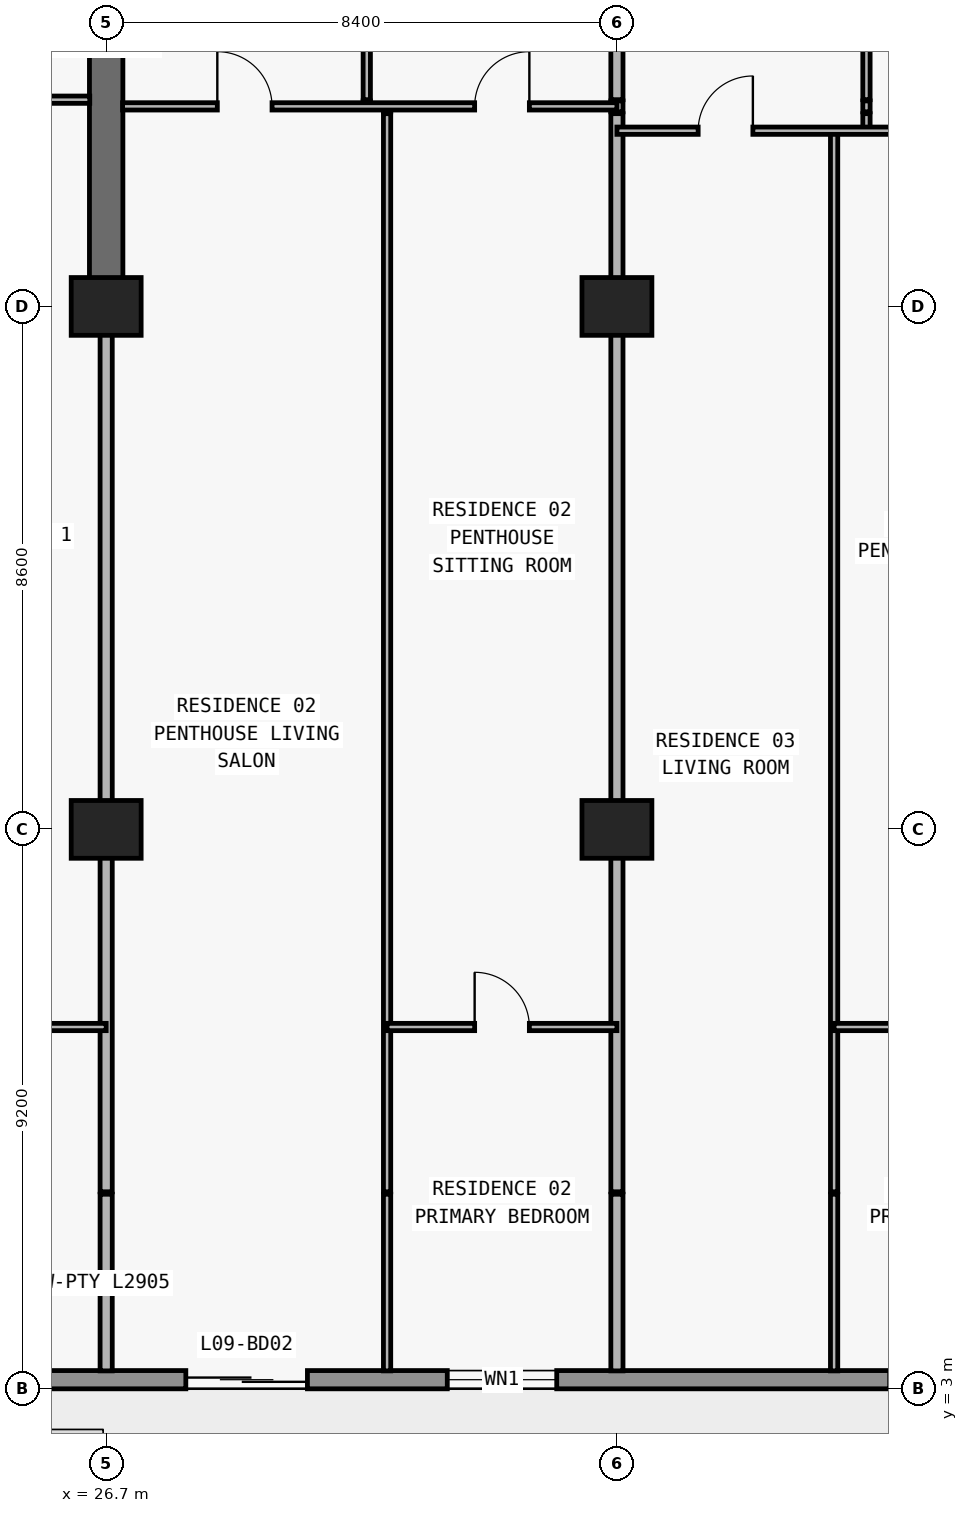
"""IFC4 building model, lengths in metres.
Left out: names, types, materials, properties, quantities, classifications, styles, units other than length and angle.
Written with IfcOpenShell. Run it as: python <this file> out.ifc"""

import sys

from ifc_helpers import new_model, si_unit, direction, frame, frame_2d, origin, origin_2d, place, context, subcontext, project, spatial, rectangle, extrude, element, fill, save


model = new_model("IFC4")
c1 = context("Model", 3, precision=1e-05, world=origin(), true_north=direction((0.0, 1.0)))
c2 = subcontext(c1, "Body", "Model", "MODEL_VIEW")
j1 = project(units=[si_unit("LENGTHUNIT", "METRE"), si_unit("PLANEANGLEUNIT", "RADIAN")], contexts=[c1])
p1 = place(None, origin())
s1 = spatial("IfcSite", under=j1, at=p1, CompositionType="ELEMENT")
p2 = place(p1, origin())
s2 = spatial("IfcBuilding", under=s1, at=p2, CompositionType="ELEMENT")
p3 = place(p2, frame((0.0, 0.0, 39.9)))
s3 = spatial("IfcBuildingStorey", under=s2, at=p3, CompositionType="ELEMENT", Elevation=39.9)
for number, where, z_axis, x_axis in (
    (1, (26.7, 12.2, 0.0), (0.0, 0.0, 1.0), (1.0, 0.0, 0.0)),
    (2, (35.1, 12.2, 0.0), (0.0, 0.0, 1.0), (1.0, 0.0, 0.0)),
    (3, (26.7, 20.8, 0.0), (0.0, 0.0, 1.0), (1.0, 0.0, 0.0)),
    (4, (35.1, 20.8, 0.0), (0.0, 0.0, 1.0), (1.0, 0.0, 0.0)),
):
    element("IfcColumn", number, at=place(p3, frame(where, z_axis=z_axis, x_axis=x_axis)), inside=s3, PredefinedType="COLUMN", context=c2, shape_type="SweptSolid", body=[
        extrude(rectangle(XDim=1.15, YDim=0.95, at=origin_2d()), origin(), (0.0, 0.0, 1.0), 3.05),
    ])
p4 = place(p3, frame((26.7, 20.8, 0.0), z_axis=(0.0, 0.0, 1.0), x_axis=(0.0, 1.0, 0.0)))
e5 = element("IfcWall", 5, at=p4, inside=s3, PredefinedType="SHEAR", context=c2, shape_type="SweptSolid", body=[
    extrude(rectangle(XDim=8.6, YDim=0.55, at=frame_2d((4.3, 0.0))), origin(), (0.0, 0.0, 1.0), 3.05),
])
p5 = place(p3, frame((72.7, 3.15, 0.0), z_axis=(0.0, 0.0, 1.0), x_axis=(-1.0, 0.0, 0.0)))
e6 = element("IfcWall", 6, at=p5, inside=s3, PredefinedType="STANDARD", context=c2, shape_type="SweptSolid", body=[
    extrude(rectangle(XDim=67.6, YDim=0.3, at=frame_2d((33.8, 0.0))), origin(), (0.0, 0.0, 1.0), 3.05),
])
p6 = place(p5, frame((59.89, 0.0, 0.0)))
e7 = element("IfcOpeningElement", 7, at=p6, cuts=e6, PredefinedType="OPENING", context=c2, shape_type="SweptSolid", body=[
    extrude(rectangle(XDim=2.0, YDim=2.3, at=frame_2d((1.0, 1.15))), frame((0.0, 0.16, 0.0), z_axis=(0.0, -1.0, 0.0), x_axis=(1.0, 0.0, 0.0)), (0.0, 0.0, 1.0), 0.32),
])
p7 = place(p5, frame((55.21, 0.0, 0.65)))
e8 = element("IfcOpeningElement", 8, at=p7, cuts=e6, PredefinedType="OPENING", context=c2, shape_type="SweptSolid", body=[
    extrude(rectangle(XDim=2.6, YDim=1.85, at=frame_2d((1.3, 0.925))), frame((0.0, 0.16, 0.0), z_axis=(0.0, -1.0, 0.0), x_axis=(1.0, 0.0, 0.0)), (0.0, 0.0, 1.0), 0.32),
])
p8 = place(p5, frame((49.1, 0.0, 0.85)))
e9 = element("IfcOpeningElement", 9, at=p8, cuts=e6, PredefinedType="OPENING", context=c2, shape_type="SweptSolid", body=[
    extrude(rectangle(XDim=2.2, YDim=1.55, at=frame_2d((1.1, 0.775))), frame((0.0, 0.16, 0.0), z_axis=(0.0, -1.0, 0.0), x_axis=(1.0, 0.0, 0.0)), (0.0, 0.0, 1.0), 0.32),
])
p9 = place(p5, frame((42.69, 0.0, 0.0)))
e10 = element("IfcOpeningElement", 10, at=p9, cuts=e6, PredefinedType="OPENING", context=c2, shape_type="SweptSolid", body=[
    extrude(rectangle(XDim=2.0, YDim=2.3, at=frame_2d((1.0, 1.15))), frame((0.0, 0.16, 0.0), z_axis=(0.0, -1.0, 0.0), x_axis=(1.0, 0.0, 0.0)), (0.0, 0.0, 1.0), 0.32),
])
p10 = place(p5, frame((38.59, 0.0, 0.85)))
e11 = element("IfcOpeningElement", 11, at=p10, cuts=e6, PredefinedType="OPENING", context=c2, shape_type="SweptSolid", body=[
    extrude(rectangle(XDim=1.8, YDim=1.55, at=frame_2d((0.9, 0.775))), frame((0.0, 0.16, 0.0), z_axis=(0.0, -1.0, 0.0), x_axis=(1.0, 0.0, 0.0)), (0.0, 0.0, 1.0), 0.32),
])
p11 = place(p5, frame((30.914, 0.0, 0.85)))
e12 = element("IfcOpeningElement", 12, at=p11, cuts=e6, PredefinedType="OPENING", context=c2, shape_type="SweptSolid", body=[
    extrude(rectangle(XDim=2.2, YDim=1.55, at=frame_2d((1.1, 0.775))), frame((0.0, 0.16, 0.0), z_axis=(0.0, -1.0, 0.0), x_axis=(1.0, 0.0, 0.0)), (0.0, 0.0, 1.0), 0.32),
])
p12 = place(p5, frame((26.69, 0.0, 0.0)))
e13 = element("IfcOpeningElement", 13, at=p12, cuts=e6, PredefinedType="OPENING", context=c2, shape_type="SweptSolid", body=[
    extrude(rectangle(XDim=2.0, YDim=2.3, at=frame_2d((1.0, 1.15))), frame((0.0, 0.16, 0.0), z_axis=(0.0, -1.0, 0.0), x_axis=(1.0, 0.0, 0.0)), (0.0, 0.0, 1.0), 0.32),
])
p13 = place(p5, frame((22.59, 0.0, 0.85)))
e14 = element("IfcOpeningElement", 14, at=p13, cuts=e6, PredefinedType="OPENING", context=c2, shape_type="SweptSolid", body=[
    extrude(rectangle(XDim=1.8, YDim=1.55, at=frame_2d((0.9, 0.775))), frame((0.0, 0.16, 0.0), z_axis=(0.0, -1.0, 0.0), x_axis=(1.0, 0.0, 0.0)), (0.0, 0.0, 1.0), 0.32),
])
p14 = place(p5, frame((18.69, 0.0, 0.0)))
e15 = element("IfcOpeningElement", 15, at=p14, cuts=e6, PredefinedType="OPENING", context=c2, shape_type="SweptSolid", body=[
    extrude(rectangle(XDim=2.0, YDim=2.3, at=frame_2d((1.0, 1.15))), frame((0.0, 0.16, 0.0), z_axis=(0.0, -1.0, 0.0), x_axis=(1.0, 0.0, 0.0)), (0.0, 0.0, 1.0), 0.32),
])
p15 = place(p5, frame((14.01, 0.0, 0.65)))
e16 = element("IfcOpeningElement", 16, at=p15, cuts=e6, PredefinedType="OPENING", context=c2, shape_type="SweptSolid", body=[
    extrude(rectangle(XDim=2.6, YDim=1.85, at=frame_2d((1.3, 0.925))), frame((0.0, 0.16, 0.0), z_axis=(0.0, -1.0, 0.0), x_axis=(1.0, 0.0, 0.0)), (0.0, 0.0, 1.0), 0.32),
])
p16 = place(p5, frame((7.9, 0.0, 0.85)))
e17 = element("IfcOpeningElement", 17, at=p16, cuts=e6, PredefinedType="OPENING", context=c2, shape_type="SweptSolid", body=[
    extrude(rectangle(XDim=2.2, YDim=1.55, at=frame_2d((1.1, 0.775))), frame((0.0, 0.16, 0.0), z_axis=(0.0, -1.0, 0.0), x_axis=(1.0, 0.0, 0.0)), (0.0, 0.0, 1.0), 0.32),
])
p17 = place(p3, frame((26.7, 3.295, 0.0), z_axis=(0.0, 0.0, 1.0), x_axis=(0.0, 1.0, 0.0)))
e18 = element("IfcWall", 18, at=p17, inside=s3, PredefinedType="PARTITIONING", context=c2, shape_type="SweptSolid", body=[
    extrude(rectangle(XDim=2.905, YDim=0.2, at=frame_2d((1.453, 0.0))), origin(), (0.0, 0.0, 1.0), 3.05),
])
p18 = place(p3, frame((26.7, 6.24, 0.0), z_axis=(0.0, 0.0, 1.0), x_axis=(0.0, 1.0, 0.0)))
e19 = element("IfcWall", 19, at=p18, inside=s3, PredefinedType="PARTITIONING", context=c2, shape_type="SweptSolid", body=[
    extrude(rectangle(XDim=14.555, YDim=0.2, at=frame_2d((7.277, 0.0))), origin(), (0.0, 0.0, 1.0), 2.11),
])
p19 = place(p3, frame((30.986, 24.09, 0.0), z_axis=(0.0, 0.0, 1.0), x_axis=(0.0, 1.0, 0.0)))
e20 = element("IfcWall", 20, at=p19, inside=s3, PredefinedType="PARTITIONING", context=c2, shape_type="SweptSolid", body=[
    extrude(rectangle(XDim=0.09, YDim=0.12, at=frame_2d((0.045, 0.0))), origin(), (0.0, 0.0, 1.0), 2.423),
])
p20 = place(p3, frame((30.986, 24.2, 0.0), z_axis=(0.0, 0.0, 1.0), x_axis=(0.0, 1.0, 0.0)))
e21 = element("IfcWall", 21, at=p20, inside=s3, PredefinedType="PARTITIONING", context=c2, shape_type="SweptSolid", body=[
    extrude(rectangle(XDim=4.38, YDim=0.12, at=frame_2d((2.19, 0.0))), origin(), (0.0, 0.0, 1.0), 2.423),
])
p21 = place(p20, frame((1.74, 0.0, 0.0)))
e22 = element("IfcOpeningElement", 22, at=p21, cuts=e21, PredefinedType="OPENING", context=c2, shape_type="SweptSolid", body=[
    extrude(rectangle(XDim=0.9, YDim=2.15, at=frame_2d((0.45, 1.075))), frame((0.0, 0.07, 0.0), z_axis=(0.0, -1.0, 0.0), x_axis=(1.0, 0.0, 0.0)), (0.0, 0.0, 1.0), 0.14),
])
p22 = place(p3, frame((31.32, 3.295, 0.0), z_axis=(0.0, 0.0, 1.0), x_axis=(0.0, 1.0, 0.0)))
e23 = element("IfcWall", 23, at=p22, inside=s3, PredefinedType="PARTITIONING", context=c2, shape_type="SweptSolid", body=[
    extrude(rectangle(XDim=2.905, YDim=0.12, at=frame_2d((1.453, 0.0))), origin(), (0.0, 0.0, 1.0), 3.05),
])
p23 = place(p3, frame((31.32, 6.24, 0.0), z_axis=(0.0, 0.0, 1.0), x_axis=(0.0, 1.0, 0.0)))
e24 = element("IfcWall", 24, at=p23, inside=s3, PredefinedType="PARTITIONING", context=c2, shape_type="SweptSolid", body=[
    extrude(rectangle(XDim=17.73, YDim=0.12, at=frame_2d((8.865, 0.0))), origin(), (0.0, 0.0, 1.0), 3.05),
])
p24 = place(p3, frame((31.32, 24.0, 0.0), z_axis=(0.0, 0.0, 1.0), x_axis=(0.0, 1.0, 0.0)))
e25 = element("IfcWall", 25, at=p24, inside=s3, PredefinedType="PARTITIONING", context=c2, shape_type="SweptSolid", body=[
    extrude(rectangle(XDim=0.09, YDim=0.12, at=frame_2d((0.045, 0.0))), origin(), (0.0, 0.0, 1.0), 3.05),
])
p25 = place(p3, frame((35.1, 3.295, 0.0), z_axis=(0.0, 0.0, 1.0), x_axis=(0.0, 1.0, 0.0)))
e26 = element("IfcWall", 26, at=p25, inside=s3, PredefinedType="PARTITIONING", context=c2, shape_type="SweptSolid", body=[
    extrude(rectangle(XDim=2.905, YDim=0.2, at=frame_2d((1.453, 0.0))), origin(), (0.0, 0.0, 1.0), 3.05),
])
p26 = place(p3, frame((35.1, 6.24, 0.0), z_axis=(0.0, 0.0, 1.0), x_axis=(0.0, 1.0, 0.0)))
e27 = element("IfcWall", 27, at=p26, inside=s3, PredefinedType="PARTITIONING", context=c2, shape_type="SweptSolid", body=[
    extrude(rectangle(XDim=17.73, YDim=0.2, at=frame_2d((8.865, 0.0))), origin(), (0.0, 0.0, 1.0), 2.11),
])
p27 = place(p3, frame((35.1, 24.0, 0.0), z_axis=(0.0, 0.0, 1.0), x_axis=(0.0, 1.0, 0.0)))
e28 = element("IfcWall", 28, at=p27, inside=s3, PredefinedType="PARTITIONING", context=c2, shape_type="SweptSolid", body=[
    extrude(rectangle(XDim=0.18, YDim=0.2, at=frame_2d((0.09, 0.0))), origin(), (0.0, 0.0, 1.0), 2.11),
])
p28 = place(p3, frame((35.1, 24.2, 0.0), z_axis=(0.0, 0.0, 1.0), x_axis=(0.0, 1.0, 0.0)))
e29 = element("IfcWall", 29, at=p28, inside=s3, PredefinedType="PARTITIONING", context=c2, shape_type="SweptSolid", body=[
    extrude(rectangle(XDim=4.38, YDim=0.2, at=frame_2d((2.19, 0.0))), origin(), (0.0, 0.0, 1.0), 2.11),
])
p29 = place(p3, frame((38.672, 3.295, 0.0), z_axis=(0.0, 0.0, 1.0), x_axis=(0.0, 1.0, 0.0)))
e30 = element("IfcWall", 30, at=p29, inside=s3, PredefinedType="PARTITIONING", context=c2, shape_type="SweptSolid", body=[
    extrude(rectangle(XDim=2.905, YDim=0.12, at=frame_2d((1.453, 0.0))), origin(), (0.0, 0.0, 1.0), 3.05),
])
p30 = place(p3, frame((38.672, 6.24, 0.0), z_axis=(0.0, 0.0, 1.0), x_axis=(0.0, 1.0, 0.0)))
e31 = element("IfcWall", 31, at=p30, inside=s3, PredefinedType="PARTITIONING", context=c2, shape_type="SweptSolid", body=[
    extrude(rectangle(XDim=17.45, YDim=0.12, at=frame_2d((8.725, 0.0))), origin(), (0.0, 0.0, 1.0), 2.423),
])
p31 = place(p3, frame((39.204, 23.69, 0.0), z_axis=(0.0, 0.0, 1.0), x_axis=(0.0, 1.0, 0.0)))
e32 = element("IfcWall", 32, at=p31, inside=s3, PredefinedType="PARTITIONING", context=c2, shape_type="SweptSolid", body=[
    extrude(rectangle(XDim=0.28, YDim=0.12, at=frame_2d((0.14, 0.0))), origin(), (0.0, 0.0, 1.0), 3.05),
])
p32 = place(p3, frame((39.204, 24.0, 0.0), z_axis=(0.0, 0.0, 1.0), x_axis=(0.0, 1.0, 0.0)))
e33 = element("IfcWall", 33, at=p32, inside=s3, PredefinedType="PARTITIONING", context=c2, shape_type="SweptSolid", body=[
    extrude(rectangle(XDim=0.18, YDim=0.12, at=frame_2d((0.09, 0.0))), origin(), (0.0, 0.0, 1.0), 3.05),
])
p33 = place(p3, frame((39.204, 24.2, 0.0), z_axis=(0.0, 0.0, 1.0), x_axis=(0.0, 1.0, 0.0)))
e34 = element("IfcWall", 34, at=p33, inside=s3, PredefinedType="PARTITIONING", context=c2, shape_type="SweptSolid", body=[
    extrude(rectangle(XDim=4.38, YDim=0.12, at=frame_2d((2.19, 0.0))), origin(), (0.0, 0.0, 1.0), 3.05),
])
p34 = place(p33, frame((1.74, 0.0, 0.0)))
e35 = element("IfcOpeningElement", 35, at=p34, cuts=e34, PredefinedType="OPENING", context=c2, shape_type="SweptSolid", body=[
    extrude(rectangle(XDim=0.9, YDim=2.15, at=frame_2d((0.45, 1.075))), frame((0.0, 0.07, 0.0), z_axis=(0.0, -1.0, 0.0), x_axis=(1.0, 0.0, 0.0)), (0.0, 0.0, 1.0), 0.14),
])
p35 = place(p3, frame((18.3, 8.95, 0.0), z_axis=(0.0, 0.0, 1.0), x_axis=(1.0, 0.0, 0.0)))
e36 = element("IfcWall", 36, at=p35, inside=s3, PredefinedType="PARTITIONING", context=c2, shape_type="SweptSolid", body=[
    extrude(rectangle(XDim=8.4, YDim=0.12, at=frame_2d((4.2, 0.0))), origin(), (0.0, 0.0, 1.0), 3.05),
])
p36 = place(p35, frame((3.75, 0.0, 0.0)))
e37 = element("IfcOpeningElement", 37, at=p36, cuts=e36, PredefinedType="OPENING", context=c2, shape_type="SweptSolid", body=[
    extrude(rectangle(XDim=0.9, YDim=2.15, at=frame_2d((0.45, 1.075))), frame((0.0, 0.07, 0.0), z_axis=(0.0, -1.0, 0.0), x_axis=(1.0, 0.0, 0.0)), (0.0, 0.0, 1.0), 0.14),
])
p37 = place(p3, frame((31.32, 8.95, 0.0), z_axis=(0.0, 0.0, 1.0), x_axis=(1.0, 0.0, 0.0)))
e38 = element("IfcWall", 38, at=p37, inside=s3, PredefinedType="PARTITIONING", context=c2, shape_type="SweptSolid", body=[
    extrude(rectangle(XDim=3.78, YDim=0.12, at=frame_2d((1.89, 0.0))), origin(), (0.0, 0.0, 1.0), 3.05),
])
p38 = place(p37, frame((1.44, 0.0, 0.0)))
e39 = element("IfcOpeningElement", 39, at=p38, cuts=e38, PredefinedType="OPENING", context=c2, shape_type="SweptSolid", body=[
    extrude(rectangle(XDim=0.9, YDim=2.15, at=frame_2d((0.45, 1.075))), frame((0.0, 0.07, 0.0), z_axis=(0.0, -1.0, 0.0), x_axis=(1.0, 0.0, 0.0)), (0.0, 0.0, 1.0), 0.14),
])
p39 = place(p3, frame((38.672, 8.95, 0.0), z_axis=(0.0, 0.0, 1.0), x_axis=(1.0, 0.0, 0.0)))
e40 = element("IfcWall", 40, at=p39, inside=s3, PredefinedType="PARTITIONING", context=c2, shape_type="SweptSolid", body=[
    extrude(rectangle(XDim=4.028, YDim=0.12, at=frame_2d((2.014, 0.0))), origin(), (0.0, 0.0, 1.0), 3.05),
])
p40 = place(p39, frame((1.564, 0.0, 0.0)))
e41 = element("IfcOpeningElement", 41, at=p40, cuts=e40, PredefinedType="OPENING", context=c2, shape_type="SweptSolid", body=[
    extrude(rectangle(XDim=0.9, YDim=2.15, at=frame_2d((0.45, 1.075))), frame((0.0, 0.07, 0.0), z_axis=(0.0, -1.0, 0.0), x_axis=(1.0, 0.0, 0.0)), (0.0, 0.0, 1.0), 0.14),
])
p41 = place(p3, frame((35.1, 23.69, 0.0), z_axis=(0.0, 0.0, 1.0), x_axis=(1.0, 0.0, 0.0)))
e42 = element("IfcWall", 42, at=p41, inside=s3, PredefinedType="PARTITIONING", context=c2, shape_type="SweptSolid", body=[
    extrude(rectangle(XDim=7.6, YDim=0.12, at=frame_2d((3.8, 0.0))), origin(), (0.0, 0.0, 1.0), 3.05),
])
p42 = place(p41, frame((1.336, 0.0, 0.0)))
e43 = element("IfcOpeningElement", 43, at=p42, cuts=e42, PredefinedType="OPENING", context=c2, shape_type="SweptSolid", body=[
    extrude(rectangle(XDim=0.9, YDim=2.15, at=frame_2d((0.45, 1.075))), frame((0.0, 0.07, 0.0), z_axis=(0.0, -1.0, 0.0), x_axis=(1.0, 0.0, 0.0)), (0.0, 0.0, 1.0), 0.14),
])
p43 = place(p41, frame((5.402, 0.0, 0.0)))
e44 = element("IfcOpeningElement", 44, at=p43, cuts=e42, PredefinedType="OPENING", context=c2, shape_type="SweptSolid", body=[
    extrude(rectangle(XDim=0.9, YDim=2.15, at=frame_2d((0.45, 1.075))), frame((0.0, 0.07, 0.0), z_axis=(0.0, -1.0, 0.0), x_axis=(1.0, 0.0, 0.0)), (0.0, 0.0, 1.0), 0.14),
])
p44 = place(p3, frame((26.97, 24.09, 0.0), z_axis=(0.0, 0.0, 1.0), x_axis=(1.0, 0.0, 0.0)))
e45 = element("IfcWall", 45, at=p44, inside=s3, PredefinedType="PARTITIONING", context=c2, shape_type="SweptSolid", body=[
    extrude(rectangle(XDim=8.13, YDim=0.12, at=frame_2d((4.065, 0.0))), origin(), (0.0, 0.0, 1.0), 3.05),
])
p45 = place(p44, frame((1.558, 0.0, 0.0)))
e46 = element("IfcOpeningElement", 46, at=p45, cuts=e45, PredefinedType="OPENING", context=c2, shape_type="SweptSolid", body=[
    extrude(rectangle(XDim=0.9, YDim=2.15, at=frame_2d((0.45, 1.075))), frame((0.0, 0.07, 0.0), z_axis=(0.0, -1.0, 0.0), x_axis=(1.0, 0.0, 0.0)), (0.0, 0.0, 1.0), 0.14),
])
p46 = place(p44, frame((5.79, 0.0, 0.0)))
e47 = element("IfcOpeningElement", 47, at=p46, cuts=e45, PredefinedType="OPENING", context=c2, shape_type="SweptSolid", body=[
    extrude(rectangle(XDim=0.9, YDim=2.15, at=frame_2d((0.45, 1.075))), frame((0.0, 0.07, 0.0), z_axis=(0.0, -1.0, 0.0), x_axis=(1.0, 0.0, 0.0)), (0.0, 0.0, 1.0), 0.14),
])
p47 = place(p3, frame((18.305, 24.2, 0.0), z_axis=(0.0, 0.0, 1.0), x_axis=(1.0, 0.0, 0.0)))
e48 = element("IfcWall", 48, at=p47, inside=s3, PredefinedType="PARTITIONING", context=c2, shape_type="SweptSolid", body=[
    extrude(rectangle(XDim=8.125, YDim=0.12, at=frame_2d((4.062, 0.0))), origin(), (0.0, 0.0, 1.0), 3.05),
])
p48 = place(p47, frame((3.613, 0.0, 0.0)))
e49 = element("IfcOpeningElement", 49, at=p48, cuts=e48, PredefinedType="OPENING", context=c2, shape_type="SweptSolid", body=[
    extrude(rectangle(XDim=0.9, YDim=2.15, at=frame_2d((0.45, 1.075))), frame((0.0, 0.07, 0.0), z_axis=(0.0, -1.0, 0.0), x_axis=(1.0, 0.0, 0.0)), (0.0, 0.0, 1.0), 0.14),
])
p49 = place(p9, origin())
e50 = element("IfcDoor", 50, at=p49, inside=s3, OperationType="DOUBLE_DOOR_SLIDING", PredefinedType="DOOR", context=c2, shape_type="SweptSolid", body=[
    extrude(rectangle(XDim=2.0, YDim=2.3, at=frame_2d((1.0, 1.15))), frame((0.0, 0.025, 0.0), z_axis=(0.0, -1.0, 0.0), x_axis=(1.0, 0.0, 0.0)), (0.0, 0.0, 1.0), 0.05),
])
fill(e10, e50)
p50 = place(p10, origin())
e51 = element("IfcWindow", 51, at=p50, inside=s3, PartitioningType="SINGLE_PANEL", PredefinedType="WINDOW", context=c2, shape_type="SweptSolid", body=[
    extrude(rectangle(XDim=1.8, YDim=1.55, at=frame_2d((0.9, 0.775))), frame((0.0, 0.03, 0.0), z_axis=(0.0, -1.0, 0.0), x_axis=(1.0, 0.0, 0.0)), (0.0, 0.0, 1.0), 0.06),
])
fill(e11, e51)
p51 = place(p45, origin())
e52 = element("IfcDoor", 52, at=p51, inside=s3, OperationType="SINGLE_SWING_LEFT", PredefinedType="DOOR", context=c2, shape_type="SweptSolid", body=[
    extrude(rectangle(XDim=0.9, YDim=2.15, at=frame_2d((0.45, 1.075))), frame((0.0, 0.025, 0.0), z_axis=(0.0, -1.0, 0.0), x_axis=(1.0, 0.0, 0.0)), (0.0, 0.0, 1.0), 0.05),
])
fill(e46, e52)
p52 = place(p46, origin())
e53 = element("IfcDoor", 53, at=p52, inside=s3, OperationType="SINGLE_SWING_RIGHT", PredefinedType="DOOR", context=c2, shape_type="SweptSolid", body=[
    extrude(rectangle(XDim=0.9, YDim=2.15, at=frame_2d((0.45, 1.075))), frame((0.0, 0.025, 0.0), z_axis=(0.0, -1.0, 0.0), x_axis=(1.0, 0.0, 0.0)), (0.0, 0.0, 1.0), 0.05),
])
fill(e47, e53)
p53 = place(p38, origin())
e54 = element("IfcDoor", 54, at=p53, inside=s3, OperationType="SINGLE_SWING_LEFT", PredefinedType="DOOR", context=c2, shape_type="SweptSolid", body=[
    extrude(rectangle(XDim=0.9, YDim=2.15, at=frame_2d((0.45, 1.075))), frame((0.0, 0.025, 0.0), z_axis=(0.0, -1.0, 0.0), x_axis=(1.0, 0.0, 0.0)), (0.0, 0.0, 1.0), 0.05),
])
fill(e39, e54)
p54 = place(p42, origin())
e55 = element("IfcDoor", 55, at=p54, inside=s3, OperationType="SINGLE_SWING_RIGHT", PredefinedType="DOOR", context=c2, shape_type="SweptSolid", body=[
    extrude(rectangle(XDim=0.9, YDim=2.15, at=frame_2d((0.45, 1.075))), frame((0.0, 0.025, 0.0), z_axis=(0.0, -1.0, 0.0), x_axis=(1.0, 0.0, 0.0)), (0.0, 0.0, 1.0), 0.05),
])
fill(e43, e55)
save(model, sys.argv[1])
